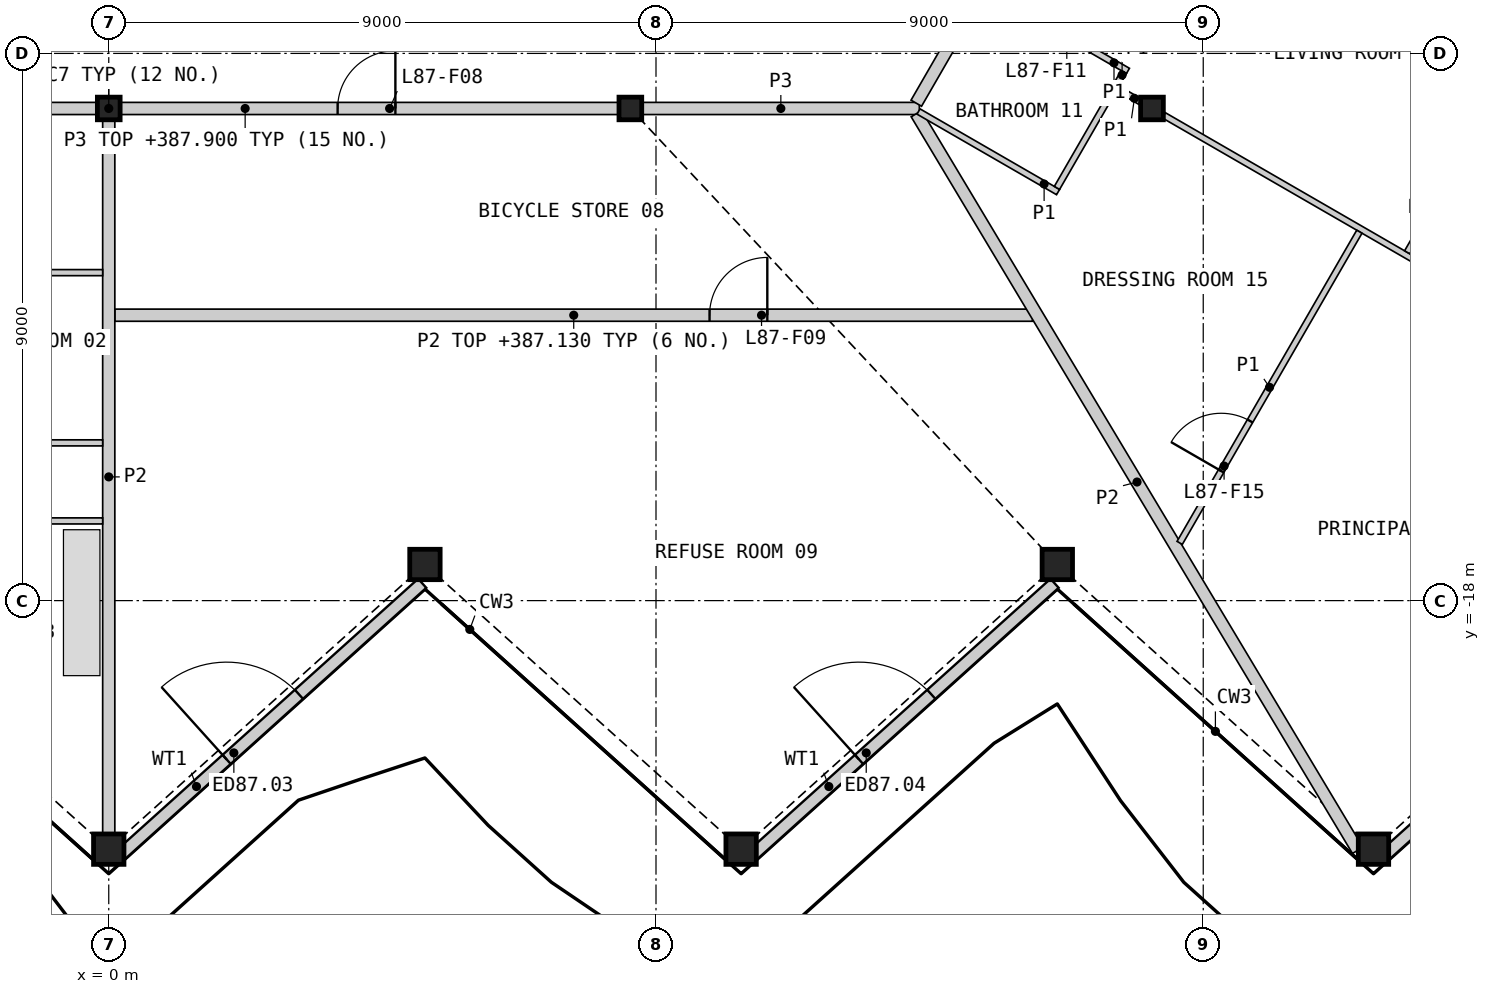
"""IFC4 building model, lengths in metres.
Left out: names, types, materials, properties, quantities, classifications, styles, units other than length and angle.
Written with IfcOpenShell. Run it as: python <this file> out.ifc"""

import sys

from ifc_helpers import new_model, si_unit, direction, frame, frame_2d, origin, origin_2d, place, context, subcontext, project, spatial, rectangle, hollow_rectangle, i_section, extrude, element, fill, save


model = new_model("IFC4")
c1 = context("Model", 3, precision=1e-05, world=origin(), true_north=direction((0.0, 1.0)))
c2 = subcontext(c1, "Body", "Model", "MODEL_VIEW")
j1 = project(units=[si_unit("LENGTHUNIT", "METRE"), si_unit("PLANEANGLEUNIT", "RADIAN")], contexts=[c1])
p1 = place(None, origin())
s1 = spatial("IfcSite", under=j1, at=p1, CompositionType="ELEMENT")
p2 = place(p1, origin())
s2 = spatial("IfcBuilding", under=s1, at=p2, CompositionType="ELEMENT")
p3 = place(p2, frame((0.0, 0.0, 384.8)))
s3 = spatial("IfcBuildingStorey", under=s2, at=p3, CompositionType="ELEMENT", Elevation=384.8)
for number, where, z_axis, x_axis in (
    (1, (0.0, -22.088, 0.0), (0.0, 0.0, 1.0), (1.0, 0.0, 0.0)),
    (2, (5.2, -17.406, 0.0), (0.0, 0.0, 1.0), (1.0, 0.0, 0.0)),
    (3, (10.4, -22.088, 0.0), (0.0, 0.0, 1.0), (1.0, 0.0, 0.0)),
    (4, (15.6, -17.406, 0.0), (0.0, 0.0, 1.0), (1.0, 0.0, 0.0)),
    (5, (20.8, -22.088, 0.0), (0.0, 0.0, 1.0), (1.0, 0.0, 0.0)),
):
    element("IfcColumn", number, at=place(p3, frame(where, z_axis=z_axis, x_axis=x_axis)), inside=s3, PredefinedType="COLUMN", context=c2, shape_type="SweptSolid", body=[
        extrude(hollow_rectangle(XDim=0.5, YDim=0.5, WallThickness=0.03, at=origin_2d()), origin(), (0.0, 0.0, 1.0), 3.4),
    ])
for number, where, z_axis, x_axis in (
    (6, (0.0, -9.906, 0.0), (0.0, 0.0, 1.0), (1.0, 0.0, 0.0)),
    (7, (8.578, -9.906, 0.0), (0.0, 0.0, 1.0), (1.0, 0.0, 0.0)),
    (8, (17.157, -9.906, 0.0), (0.0, 0.0, 1.0), (1.0, 0.0, 0.0)),
):
    element("IfcColumn", number, at=place(p3, frame(where, z_axis=z_axis, x_axis=x_axis)), inside=s3, PredefinedType="COLUMN", context=c2, shape_type="SweptSolid", body=[
        extrude(i_section(OverallWidth=0.374, OverallDepth=0.372, WebThickness=0.016, FlangeThickness=0.026, at=origin_2d()), origin(), (0.0, 0.0, 1.0), 3.4),
    ])
p4 = place(p3, frame((0.205, -22.173, 0.0), z_axis=(0.0, 0.0, 1.0), x_axis=(0.743135582201, 0.669140871915, 0.0)))
e9 = element("IfcWall", 9, at=p4, inside=s3, PredefinedType="SOLIDWALL", context=c2, shape_type="SweptSolid", body=[
    extrude(rectangle(XDim=6.662, YDim=0.2, at=frame_2d((3.331, 0.0))), origin(), (0.0, 0.0, 1.0), 2.634),
])
p5 = place(p4, frame((2.333, 0.0, 0.0)))
e10 = element("IfcOpeningElement", 10, at=p5, cuts=e9, PredefinedType="OPENING", context=c2, shape_type="SweptSolid", body=[
    extrude(rectangle(XDim=1.6, YDim=2.25, at=frame_2d((0.8, 1.125))), frame((0.0, 0.11, 0.0), z_axis=(0.0, -1.0, 0.0), x_axis=(1.0, 0.0, 0.0)), (0.0, 0.0, 1.0), 0.22),
])
p6 = place(p3, frame((10.605, -22.173, 0.0), z_axis=(0.0, 0.0, 1.0), x_axis=(0.743135582201, 0.669140871915, 0.0)))
e11 = element("IfcWall", 11, at=p6, inside=s3, PredefinedType="SOLIDWALL", context=c2, shape_type="SweptSolid", body=[
    extrude(rectangle(XDim=6.662, YDim=0.2, at=frame_2d((3.331, 0.0))), origin(), (0.0, 0.0, 1.0), 2.634),
])
p7 = place(p6, frame((2.333, 0.0, 0.0)))
e12 = element("IfcOpeningElement", 12, at=p7, cuts=e11, PredefinedType="OPENING", context=c2, shape_type="SweptSolid", body=[
    extrude(rectangle(XDim=1.6, YDim=2.25, at=frame_2d((0.8, 1.125))), frame((0.0, 0.11, 0.0), z_axis=(0.0, -1.0, 0.0), x_axis=(1.0, 0.0, 0.0)), (0.0, 0.0, 1.0), 0.22),
])
p8 = place(p3, frame((21.005, -22.173, 0.0), z_axis=(0.0, 0.0, 1.0), x_axis=(0.743135582201, 0.669140871915, 0.0)))
e13 = element("IfcWall", 13, at=p8, inside=s3, PredefinedType="SOLIDWALL", context=c2, shape_type="SweptSolid", body=[
    extrude(rectangle(XDim=6.662, YDim=0.2, at=frame_2d((3.331, 0.0))), origin(), (0.0, 0.0, 1.0), 2.634),
])
p9 = place(p8, frame((2.333, 0.0, 0.0)))
e14 = element("IfcOpeningElement", 14, at=p9, cuts=e13, PredefinedType="OPENING", context=c2, shape_type="SweptSolid", body=[
    extrude(rectangle(XDim=1.6, YDim=2.25, at=frame_2d((0.8, 1.125))), frame((0.0, 0.11, 0.0), z_axis=(0.0, -1.0, 0.0), x_axis=(1.0, 0.0, 0.0)), (0.0, 0.0, 1.0), 0.22),
])
p10 = place(p3, frame((0.197, -9.906, 0.0), z_axis=(0.0, 0.0, 1.0), x_axis=(1.0, 0.0, 0.0)))
e15 = element("IfcWall", 15, at=p10, inside=s3, PredefinedType="PARTITIONING", context=c2, shape_type="SweptSolid", body=[
    extrude(rectangle(XDim=8.185, YDim=0.2, at=frame_2d((4.092, 0.0))), origin(), (0.0, 0.0, 1.0), 3.1),
])
p11 = place(p10, frame((3.567, 0.0, 0.0)))
e16 = element("IfcOpeningElement", 16, at=p11, cuts=e15, PredefinedType="OPENING", context=c2, shape_type="SweptSolid", body=[
    extrude(rectangle(XDim=0.95, YDim=2.1, at=frame_2d((0.475, 1.05))), frame((0.0, 0.11, 0.0), z_axis=(0.0, -1.0, 0.0), x_axis=(1.0, 0.0, 0.0)), (0.0, 0.0, 1.0), 0.22),
])
p12 = place(p3, frame((-8.382, -9.906, 0.0), z_axis=(0.0, 0.0, 1.0), x_axis=(1.0, 0.0, 0.0)))
e17 = element("IfcWall", 17, at=p12, inside=s3, PredefinedType="PARTITIONING", context=c2, shape_type="SweptSolid", body=[
    extrude(rectangle(XDim=8.185, YDim=0.2, at=frame_2d((4.092, 0.0))), origin(), (0.0, 0.0, 1.0), 3.1),
])
p13 = place(p12, frame((5.213, 0.0, 0.0)))
e18 = element("IfcOpeningElement", 18, at=p13, cuts=e17, PredefinedType="OPENING", context=c2, shape_type="SweptSolid", body=[
    extrude(rectangle(XDim=1.0, YDim=2.1, at=frame_2d((0.5, 1.05))), frame((0.0, 0.11, 0.0), z_axis=(0.0, -1.0, 0.0), x_axis=(1.0, 0.0, 0.0)), (0.0, 0.0, 1.0), 0.22),
])
p14 = place(p3, frame((8.775, -9.906, 0.0), z_axis=(0.0, 0.0, 1.0), x_axis=(1.0, 0.0, 0.0)))
e19 = element("IfcWall", 19, at=p14, inside=s3, PredefinedType="PARTITIONING", context=c2, shape_type="SweptSolid", body=[
    extrude(rectangle(XDim=4.555, YDim=0.2, at=frame_2d((2.278, 0.0))), origin(), (0.0, 0.0, 1.0), 3.1),
])
p15 = place(p3, frame((13.281, -9.819, 0.0), z_axis=(0.0, 0.0, 1.0), x_axis=(0.499948957823, 0.866054870994, 0.0)))
e20 = element("IfcWall", 20, at=p15, inside=s3, PredefinedType="PARTITIONING", context=c2, shape_type="SweptSolid", body=[
    extrude(rectangle(XDim=3.701, YDim=0.2, at=frame_2d((1.851, 0.0))), origin(), (0.0, 0.0, 1.0), 3.1),
])
p16 = place(p15, frame((2.451, 0.0, 0.0)))
e21 = element("IfcOpeningElement", 21, at=p16, cuts=e20, PredefinedType="OPENING", context=c2, shape_type="SweptSolid", body=[
    extrude(rectangle(XDim=1.0, YDim=2.1, at=frame_2d((0.5, 1.05))), frame((0.0, 0.11, 0.0), z_axis=(0.0, -1.0, 0.0), x_axis=(1.0, 0.0, 0.0)), (0.0, 0.0, 1.0), 0.22),
])
p17 = place(p3, frame((0.1, -13.306, 0.0), z_axis=(0.0, 0.0, 1.0), x_axis=(1.0, 0.0, 0.0)))
e22 = element("IfcWall", 22, at=p17, inside=s3, PredefinedType="PARTITIONING", context=c2, shape_type="SweptSolid", body=[
    extrude(rectangle(XDim=15.094, YDim=0.2, at=frame_2d((7.547, 0.0))), origin(), (0.0, 0.0, 1.0), 2.33),
])
p18 = place(p17, frame((9.781, 0.0, 0.0)))
e23 = element("IfcOpeningElement", 23, at=p18, cuts=e22, PredefinedType="OPENING", context=c2, shape_type="SweptSolid", body=[
    extrude(rectangle(XDim=0.95, YDim=2.1, at=frame_2d((0.475, 1.05))), frame((0.0, 0.11, 0.0), z_axis=(0.0, -1.0, 0.0), x_axis=(1.0, 0.0, 0.0)), (0.0, 0.0, 1.0), 0.22),
])
p19 = place(p3, frame((13.282, -9.991, 0.0), z_axis=(0.0, 0.0, 1.0), x_axis=(0.513867741763, -0.857869421285, 0.0)))
e24 = element("IfcWall", 24, at=p19, inside=s3, PredefinedType="PARTITIONING", context=c2, shape_type="SweptSolid", body=[
    extrude(rectangle(XDim=14.124, YDim=0.2, at=frame_2d((7.062, 0.0))), origin(), (0.0, 0.0, 1.0), 2.33),
])
p20 = place(p3, frame((0.0, -21.828, 0.0), z_axis=(0.0, 0.0, 1.0), x_axis=(0.0, 1.0, 0.0)))
e25 = element("IfcWall", 25, at=p20, inside=s3, PredefinedType="PARTITIONING", context=c2, shape_type="SweptSolid", body=[
    extrude(rectangle(XDim=11.725, YDim=0.2, at=frame_2d((5.863, 0.0))), origin(), (0.0, 0.0, 1.0), 2.33),
])
p21 = place(p3, frame((17.354, -10.019, 0.0), z_axis=(0.0, 0.0, 1.0), x_axis=(0.866019680922, -0.500009912158, 0.0)))
e26 = element("IfcWall", 26, at=p21, inside=s3, PredefinedType="PARTITIONING", context=c2, shape_type="SweptSolid", body=[
    extrude(rectangle(XDim=10.881, YDim=0.1, at=frame_2d((5.44, 0.0))), origin(), (0.0, 0.0, 1.0), 2.33),
])
p22 = place(p21, frame((8.176, 0.0, 0.0)))
e27 = element("IfcOpeningElement", 27, at=p22, cuts=e26, PredefinedType="OPENING", context=c2, shape_type="SweptSolid", body=[
    extrude(rectangle(XDim=0.95, YDim=2.1, at=frame_2d((0.475, 1.05))), frame((0.0, 0.06, 0.0), z_axis=(0.0, -1.0, 0.0), x_axis=(1.0, 0.0, 0.0)), (0.0, 0.0, 1.0), 0.12),
])
p23 = place(p3, frame((21.354, -12.271, 0.0), z_axis=(0.0, 0.0, 1.0), x_axis=(0.499983931063, 0.866034680991, 0.0)))
e28 = element("IfcWall", 28, at=p23, inside=s3, PredefinedType="PARTITIONING", context=c2, shape_type="SweptSolid", body=[
    extrude(rectangle(XDim=6.358, YDim=0.1, at=frame_2d((3.179, 0.0))), origin(), (0.0, 0.0, 1.0), 2.33),
])
p24 = place(p23, frame((1.252, 0.0, 0.0)))
e29 = element("IfcOpeningElement", 29, at=p24, cuts=e28, PredefinedType="OPENING", context=c2, shape_type="SweptSolid", body=[
    extrude(rectangle(XDim=0.95, YDim=2.1, at=frame_2d((0.475, 1.05))), frame((0.0, 0.06, 0.0), z_axis=(0.0, -1.0, 0.0), x_axis=(1.0, 0.0, 0.0)), (0.0, 0.0, 1.0), 0.12),
])
p25 = place(p3, frame((17.613, -17.051, 0.0), z_axis=(0.0, 0.0, 1.0), x_axis=(0.499982307286, 0.866035618437, 0.0)))
e30 = element("IfcWall", 30, at=p25, inside=s3, PredefinedType="PARTITIONING", context=c2, shape_type="SweptSolid", body=[
    extrude(rectangle(XDim=5.91, YDim=0.1, at=frame_2d((2.955, 0.0))), origin(), (0.0, 0.0, 1.0), 2.33),
])
p26 = place(p25, frame((1.365, 0.0, 0.0)))
e31 = element("IfcOpeningElement", 31, at=p26, cuts=e30, PredefinedType="OPENING", context=c2, shape_type="SweptSolid", body=[
    extrude(rectangle(XDim=0.95, YDim=2.1, at=frame_2d((0.475, 1.05))), frame((0.0, 0.06, 0.0), z_axis=(0.0, -1.0, 0.0), x_axis=(1.0, 0.0, 0.0)), (0.0, 0.0, 1.0), 0.12),
])
p27 = place(p3, frame((-5.15, -16.689, 0.0), z_axis=(0.0, 0.0, 1.0), x_axis=(1.0, 0.0, 0.0)))
e32 = element("IfcWall", 32, at=p27, inside=s3, PredefinedType="PARTITIONING", context=c2, shape_type="SweptSolid", body=[
    extrude(rectangle(XDim=5.05, YDim=0.1, at=frame_2d((2.525, 0.0))), origin(), (0.0, 0.0, 1.0), 2.33),
])
p28 = place(p27, frame((1.25, 0.0, 0.0)))
e33 = element("IfcOpeningElement", 33, at=p28, cuts=e32, PredefinedType="OPENING", context=c2, shape_type="SweptSolid", body=[
    extrude(rectangle(XDim=0.95, YDim=2.1, at=frame_2d((0.475, 1.05))), frame((0.0, 0.06, 0.0), z_axis=(0.0, -1.0, 0.0), x_axis=(1.0, 0.0, 0.0)), (0.0, 0.0, 1.0), 0.12),
])
for number, where, z_axis, x_axis in (
    (34, (-2.65, -12.606, 0.0), (0.0, 0.0, 1.0), (1.0, 0.0, 0.0)),
    (35, (-2.65, -15.406, 0.0), (0.0, 0.0, 1.0), (1.0, 0.0, 0.0)),
):
    element("IfcWall", number, at=place(p3, frame(where, z_axis=z_axis, x_axis=x_axis)), inside=s3, PredefinedType="PARTITIONING", context=c2, shape_type="SweptSolid", body=[
        extrude(rectangle(XDim=2.55, YDim=0.1, at=frame_2d((1.275, 0.0))), origin(), (0.0, 0.0, 1.0), 2.33),
    ])
p29 = place(p3, frame((13.317, -9.956, 0.0), z_axis=(0.0, 0.0, 1.0), x_axis=(0.866052124492, -0.499953715521, 0.0)))
e36 = element("IfcWall", 36, at=p29, inside=s3, PredefinedType="PARTITIONING", context=c2, shape_type="SweptSolid", body=[
    extrude(rectangle(XDim=2.65, YDim=0.1, at=frame_2d((1.325, 0.0))), origin(), (0.0, 0.0, 1.0), 2.33),
])
p30 = place(p3, frame((14.468, -7.964, 0.0), z_axis=(0.0, 0.0, 1.0), x_axis=(0.86603978909, -0.499975083092, 0.0)))
e37 = element("IfcWall", 37, at=p30, inside=s3, PredefinedType="PARTITIONING", context=c2, shape_type="SweptSolid", body=[
    extrude(rectangle(XDim=2.649, YDim=0.1, at=frame_2d((1.325, 0.0))), origin(), (0.0, 0.0, 1.0), 2.33),
])
p31 = place(p30, frame((1.013, 0.0, 0.0)))
e38 = element("IfcOpeningElement", 38, at=p31, cuts=e37, PredefinedType="OPENING", context=c2, shape_type="SweptSolid", body=[
    extrude(rectangle(XDim=0.95, YDim=2.1, at=frame_2d((0.475, 1.05))), frame((0.0, 0.06, 0.0), z_axis=(0.0, -1.0, 0.0), x_axis=(1.0, 0.0, 0.0)), (0.0, 0.0, 1.0), 0.12),
])
p32 = place(p3, frame((15.594, -11.212, 0.0), z_axis=(0.0, 0.0, 1.0), x_axis=(0.500011643316, 0.866018681408, 0.0)))
e39 = element("IfcWall", 39, at=p32, inside=s3, PredefinedType="PARTITIONING", context=c2, shape_type="SweptSolid", body=[
    extrude(rectangle(XDim=1.973, YDim=0.1, at=frame_2d((0.987, 0.0))), origin(), (0.0, 0.0, 1.0), 2.33),
])
p33 = place(p3, frame((16.594, -9.581, 0.0), z_axis=(0.0, 0.0, 1.0), x_axis=(0.866137484628, -0.499805820016, 0.0)))
e40 = element("IfcWall", 40, at=p33, inside=s3, PredefinedType="PARTITIONING", context=c2, shape_type="SweptSolid", body=[
    extrude(rectangle(XDim=0.423, YDim=0.1, at=frame_2d((0.211, 0.0))), origin(), (0.0, 0.0, 1.0), 2.33),
])
p34 = place(p3, frame((16.582, -9.501, 0.0), z_axis=(0.0, 0.0, 1.0), x_axis=(0.498246276801, 0.867035551551, 0.0)))
e41 = element("IfcWall", 41, at=p34, inside=s3, PredefinedType="PARTITIONING", context=c2, shape_type="SweptSolid", body=[
    extrude(rectangle(XDim=0.224, YDim=0.1, at=frame_2d((0.112, 0.0))), origin(), (0.0, 0.0, 1.0), 2.33),
])
p35 = place(p5, origin())
e42 = element("IfcDoor", 42, at=p35, inside=s3, OperationType="DOUBLE_DOOR_SINGLE_SWING", PredefinedType="DOOR", context=c2, shape_type="SweptSolid", body=[
    extrude(rectangle(XDim=1.6, YDim=2.25, at=frame_2d((0.8, 1.125))), frame((0.0, 0.025, 0.0), z_axis=(0.0, -1.0, 0.0), x_axis=(1.0, 0.0, 0.0)), (0.0, 0.0, 1.0), 0.05),
])
fill(e10, e42)
p36 = place(p7, origin())
e43 = element("IfcDoor", 43, at=p36, inside=s3, OperationType="DOUBLE_DOOR_SINGLE_SWING", PredefinedType="DOOR", context=c2, shape_type="SweptSolid", body=[
    extrude(rectangle(XDim=1.6, YDim=2.25, at=frame_2d((0.8, 1.125))), frame((0.0, 0.025, 0.0), z_axis=(0.0, -1.0, 0.0), x_axis=(1.0, 0.0, 0.0)), (0.0, 0.0, 1.0), 0.05),
])
fill(e12, e43)
p37 = place(p11, origin())
e44 = element("IfcDoor", 44, at=p37, inside=s3, OperationType="SINGLE_SWING_RIGHT", PredefinedType="DOOR", context=c2, shape_type="SweptSolid", body=[
    extrude(rectangle(XDim=0.95, YDim=2.1, at=frame_2d((0.475, 1.05))), frame((0.0, 0.025, 0.0), z_axis=(0.0, -1.0, 0.0), x_axis=(1.0, 0.0, 0.0)), (0.0, 0.0, 1.0), 0.05),
])
fill(e16, e44)
p38 = place(p18, origin())
e45 = element("IfcDoor", 45, at=p38, inside=s3, OperationType="SINGLE_SWING_RIGHT", PredefinedType="DOOR", context=c2, shape_type="SweptSolid", body=[
    extrude(rectangle(XDim=0.95, YDim=2.1, at=frame_2d((0.475, 1.05))), frame((0.0, 0.025, 0.0), z_axis=(0.0, -1.0, 0.0), x_axis=(1.0, 0.0, 0.0)), (0.0, 0.0, 1.0), 0.05),
])
fill(e23, e45)
p39 = place(p26, origin())
e46 = element("IfcDoor", 46, at=p39, inside=s3, OperationType="SINGLE_SWING_LEFT", PredefinedType="DOOR", context=c2, shape_type="SweptSolid", body=[
    extrude(rectangle(XDim=0.95, YDim=2.1, at=frame_2d((0.475, 1.05))), frame((0.0, 0.025, 0.0), z_axis=(0.0, -1.0, 0.0), x_axis=(1.0, 0.0, 0.0)), (0.0, 0.0, 1.0), 0.05),
])
fill(e31, e46)
save(model, sys.argv[1])
